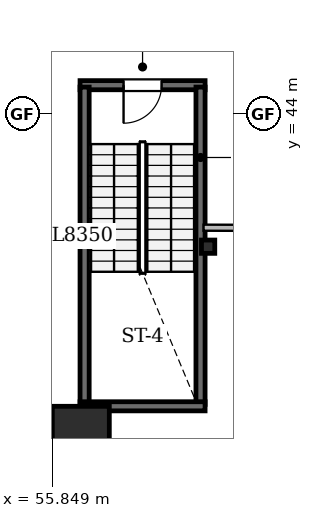
"""IFC4 building model, lengths in metres.
Left out: names, types, materials, properties, quantities, classifications, styles, units other than length and angle.
Written with IfcOpenShell. Run it as: python <this file> out.ifc"""

import sys

from ifc_helpers import new_model, si_unit, direction, frame, frame_2d, origin, origin_2d, place, context, subcontext, project, spatial, rectangle, i_section, extrude, element, fill, save


model = new_model("IFC4")
c1 = context("Model", 3, precision=1e-05, world=origin(), true_north=direction((0.0, 1.0)))
c2 = subcontext(c1, "Body", "Model", "MODEL_VIEW")
j1 = project(units=[si_unit("LENGTHUNIT", "METRE"), si_unit("PLANEANGLEUNIT", "RADIAN")], contexts=[c1])
p1 = place(None, origin())
s1 = spatial("IfcSite", under=j1, at=p1, CompositionType="ELEMENT")
p2 = place(p1, origin())
s2 = spatial("IfcBuilding", under=s1, at=p2, CompositionType="ELEMENT")
p3 = place(p2, frame((0.0, 0.0, 19.2)))
s3 = spatial("IfcBuildingStorey", under=s2, at=p3, CompositionType="ELEMENT", Elevation=19.2)
p4 = place(p3, frame((56.6, 35.8, 0.0), z_axis=(0.0, 0.0, 1.0), x_axis=(1.0, 0.0, 0.0)))
e1 = element("IfcColumn", 1, at=p4, inside=s3, PredefinedType="COLUMN", context=c2, shape_type="SweptSolid", body=[
    extrude(rectangle(XDim=1.5, YDim=1.0, at=origin_2d()), origin(), (0.0, 0.0, 1.0), 4.8),
])
p5 = place(p3, frame((59.95, 40.5, 0.0), z_axis=(0.0, 0.0, 1.0), x_axis=(1.0, 0.0, 0.0)))
e2 = element("IfcColumn", 2, at=p5, inside=s3, PredefinedType="PILASTER", context=c2, shape_type="SweptSolid", body=[
    extrude(i_section(OverallWidth=0.35, OverallDepth=0.35, WebThickness=0.012, FlangeThickness=0.019, FilletRadius=0.02, at=origin_2d()), origin(), (0.0, 0.0, 1.0), 4.8),
])
p6 = place(p3, frame((56.58, 44.75, 0.0), z_axis=(0.0, 0.0, 1.0), x_axis=(1.0, 0.0, 0.0)))
e3 = element("IfcWall", 3, at=p6, inside=s3, PredefinedType="SHEAR", context=c2, shape_type="SweptSolid", body=[
    extrude(rectangle(XDim=3.29, YDim=0.24, at=frame_2d((1.645, 0.0))), origin(), (0.0, 0.0, 1.0), 4.35),
])
p7 = place(p6, frame((1.145, 0.0, 0.0)))
e4 = element("IfcOpeningElement", 4, at=p7, cuts=e3, PredefinedType="OPENING", context=c2, shape_type="SweptSolid", body=[
    extrude(rectangle(XDim=1.0, YDim=2.15, at=frame_2d((0.5, 1.075))), frame((0.0, 0.13, 0.0), z_axis=(0.0, -1.0, 0.0), x_axis=(1.0, 0.0, 0.0)), (0.0, 0.0, 1.0), 0.26),
])
for number, where, z_axis, x_axis in (
    (5, (56.7, 36.35, 0.0), (0.0, 0.0, 1.0), (0.0, 1.0, 0.0)),
    (6, (59.75, 36.35, 0.0), (0.0, 0.0, 1.0), (0.0, 1.0, 0.0)),
):
    element("IfcWall", number, at=place(p3, frame(where, z_axis=z_axis, x_axis=x_axis)), inside=s3, PredefinedType="SHEAR", context=c2, shape_type="SweptSolid", body=[
        extrude(rectangle(XDim=8.35, YDim=0.24, at=frame_2d((4.175, 0.0))), origin(), (0.0, 0.0, 1.0), 4.35),
    ])
p8 = place(p3, frame((56.58, 36.3, 0.0), z_axis=(0.0, 0.0, 1.0), x_axis=(1.0, 0.0, 0.0)))
e7 = element("IfcWall", 7, at=p8, inside=s3, PredefinedType="SHEAR", context=c2, shape_type="SweptSolid", body=[
    extrude(rectangle(XDim=3.29, YDim=0.24, at=frame_2d((1.645, 0.0))), origin(), (0.0, 0.0, 1.0), 4.35),
])
p9 = place(p3, frame((70.837, 40.966, 0.0), z_axis=(0.0, 0.0, 1.0), x_axis=(-0.999995247177, 0.003083119052, 0.0)))
e8 = element("IfcWall", 8, at=p9, inside=s3, PredefinedType="SOLIDWALL", context=c2, shape_type="SweptSolid", body=[
    extrude(rectangle(XDim=11.007, YDim=0.16, at=frame_2d((5.503, 0.0))), origin(), (0.0, 0.0, 1.0), 3.638),
])
p10 = place(p3, frame((56.62, 41.0, 0.0), z_axis=(0.0, 0.0, 1.0), x_axis=(-1.0, 0.0, 0.0)))
e9 = element("IfcWall", 9, at=p10, inside=s3, PredefinedType="SOLIDWALL", context=c2, shape_type="SweptSolid", body=[
    extrude(rectangle(XDim=1.94, YDim=0.16, at=frame_2d((0.97, 0.0))), origin(), (0.0, 0.0, 1.0), 3.638),
])
p11 = place(p7, frame((1.0, 0.0, 0.0), z_axis=(0.0, 0.0, 1.0), x_axis=(-1.0, 0.0, 0.0)))
e10 = element("IfcDoor", 10, at=p11, inside=s3, OperationType="SINGLE_SWING_LEFT", PredefinedType="DOOR", context=c2, shape_type="SweptSolid", body=[
    extrude(rectangle(XDim=1.0, YDim=2.15, at=frame_2d((0.5, 1.075))), frame((0.0, 0.025, 0.0), z_axis=(0.0, -1.0, 0.0), x_axis=(1.0, 0.0, 0.0)), (0.0, 0.0, 1.0), 0.05),
])
fill(e4, e10)
save(model, sys.argv[1])
